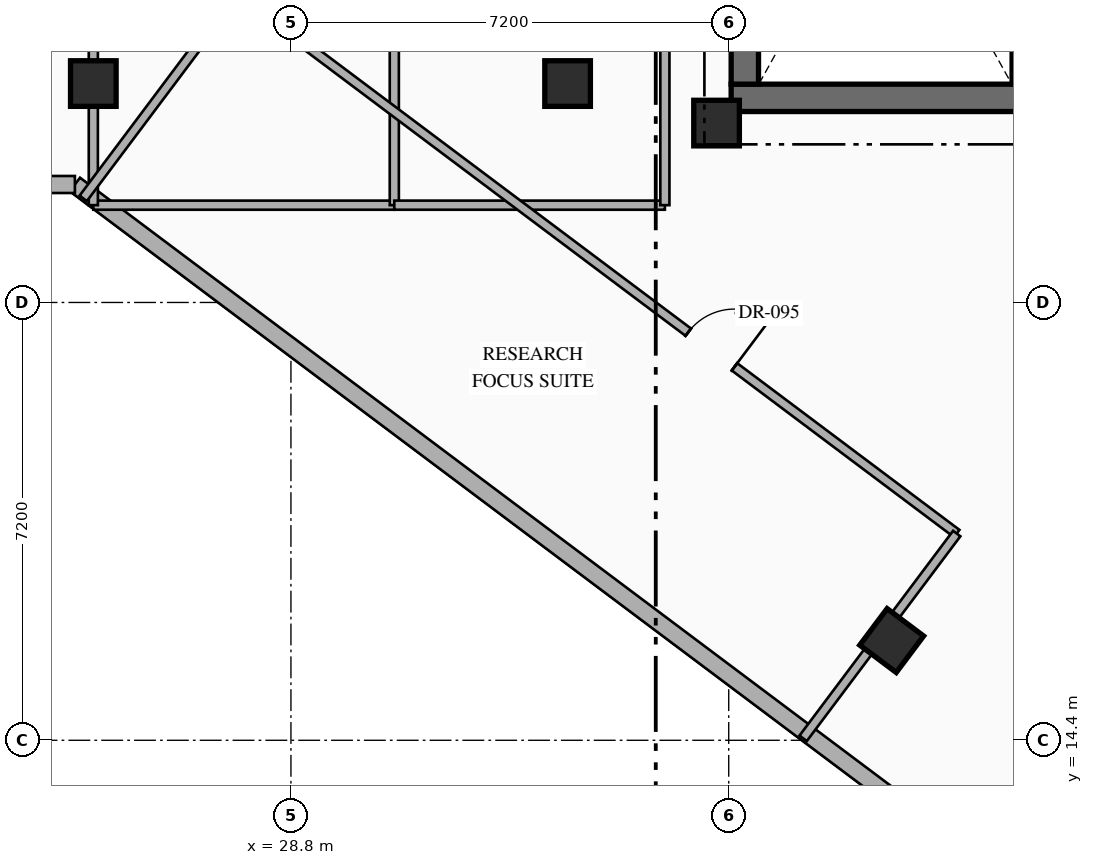
"""IFC4 building model, lengths in metres.
Left out: names, types, materials, properties, quantities, classifications, styles, units other than length and angle.
Written with IfcOpenShell. Run it as: python <this file> out.ifc"""

import sys

from ifc_helpers import new_model, si_unit, direction, frame, frame_2d, origin, origin_2d, place, context, subcontext, project, spatial, rectangle, hollow_rectangle, extrude, element, fill, save


model = new_model("IFC4")
c1 = context("Model", 3, precision=1e-05, world=origin(), true_north=direction((0.0, 1.0)))
c2 = subcontext(c1, "Body", "Model", "MODEL_VIEW")
j1 = project(units=[si_unit("LENGTHUNIT", "METRE"), si_unit("PLANEANGLEUNIT", "RADIAN")], contexts=[c1])
p1 = place(None, origin())
s1 = spatial("IfcSite", under=j1, at=p1, CompositionType="ELEMENT")
p2 = place(p1, origin())
s2 = spatial("IfcBuilding", under=s1, at=p2, CompositionType="ELEMENT")
p3 = place(p2, frame((0.0, 0.0, 209.55)))
s3 = spatial("IfcBuildingStorey", under=s2, at=p3, CompositionType="ELEMENT", Elevation=209.55)
p4 = place(p3, frame((36.04, 24.965, 0.0), z_axis=(0.0, 0.0, 1.0), x_axis=(1.0, 0.0, 0.0)))
e1 = element("IfcWall", 1, at=p4, inside=s3, PredefinedType="SHEAR", context=c2, shape_type="SweptSolid", body=[
    extrude(rectangle(XDim=7.46, YDim=0.45, at=frame_2d((3.73, 0.0))), origin(), (0.0, 0.0, 1.0), 3.6),
])
p5 = place(p3, frame((36.265, 25.19, 0.0), z_axis=(0.0, 0.0, 1.0), x_axis=(0.0, 1.0, 0.0)))
e2 = element("IfcWall", 2, at=p5, inside=s3, PredefinedType="SHEAR", context=c2, shape_type="SweptSolid", body=[
    extrude(rectangle(XDim=9.48, YDim=0.45, at=frame_2d((4.74, 0.0))), origin(), (0.0, 0.0, 1.0), 3.6),
])
p6 = place(p3, frame((40.81, 25.19, 0.0), z_axis=(0.0, 0.0, 1.0), x_axis=(0.0, 1.0, 0.0)))
e3 = element("IfcWall", 3, at=p6, inside=s3, PredefinedType="SHEAR", context=c2, shape_type="SweptSolid", body=[
    extrude(rectangle(XDim=9.48, YDim=0.3, at=frame_2d((4.74, 0.0))), origin(), (0.0, 0.0, 1.0), 3.6),
])
for number, where, z_axis, x_axis in (
    (4, (35.8, 24.55, 0.0), (0.0, 0.0, 1.0), (1.0, 0.0, 0.0)),
    (5, (25.55, 25.2, 0.0), (0.0, 0.0, 1.0), (1.0, 0.0, 0.0)),
    (6, (33.35, 25.2, 0.0), (0.0, 0.0, 1.0), (1.0, 0.0, 0.0)),
    (7, (38.68, 16.04, 0.0), (0.0, 0.0, 1.0), (0.8, -0.6, 0.0)),
):
    element("IfcColumn", number, at=place(p3, frame(where, z_axis=z_axis, x_axis=x_axis)), inside=s3, PredefinedType="COLUMN", context=c2, shape_type="SweptSolid", body=[
        extrude(hollow_rectangle(XDim=0.75, YDim=0.75, WallThickness=0.028, at=origin_2d()), origin(), (0.0, 0.0, 1.0), 3.6),
    ])
p7 = place(p3, frame((44.918, 8.787, 0.0), z_axis=(0.0, 0.0, 1.0), x_axis=(-0.800004765927, 0.599993645378, 0.0)))
e8 = element("IfcWall", 8, at=p7, inside=s3, PredefinedType="STANDARD", context=c2, shape_type="SweptSolid", body=[
    extrude(rectangle(XDim=24.588, YDim=0.28, at=frame_2d((12.294, 0.0))), origin(), (0.0, 0.0, 1.0), 3.35),
])
p8 = place(p3, frame((25.247, 23.54, 0.0), z_axis=(0.0, 0.0, 1.0), x_axis=(-1.0, 0.0, 0.0)))
e9 = element("IfcWall", 9, at=p8, inside=s3, PredefinedType="STANDARD", context=c2, shape_type="SweptSolid", body=[
    extrude(rectangle(XDim=4.789, YDim=0.28, at=frame_2d((2.395, 0.0))), origin(), (0.0, 0.0, 1.0), 3.35),
])
p9 = place(p3, frame((25.55, 23.2, 0.0), z_axis=(0.0, 0.0, 1.0), x_axis=(1.0, 0.0, 0.0)))
e10 = element("IfcWall", 10, at=p9, inside=s3, PredefinedType="PARTITIONING", context=c2, shape_type="SweptSolid", body=[
    extrude(rectangle(XDim=4.95, YDim=0.15, at=frame_2d((2.475, 0.0))), origin(), (0.0, 0.0, 1.0), 3.35),
])
p10 = place(p3, frame((25.55, 23.2, 0.0), z_axis=(0.0, 0.0, 1.0), x_axis=(0.0, 1.0, 0.0)))
e11 = element("IfcWall", 11, at=p10, inside=s3, PredefinedType="PARTITIONING", context=c2, shape_type="SweptSolid", body=[
    extrude(rectangle(XDim=7.15, YDim=0.15, at=frame_2d((3.575, 0.0))), origin(), (0.0, 0.0, 1.0), 2.757),
])
p11 = place(p3, frame((30.5, 23.2, 0.0), z_axis=(0.0, 0.0, 1.0), x_axis=(0.0, 1.0, 0.0)))
e12 = element("IfcWall", 12, at=p11, inside=s3, PredefinedType="PARTITIONING", context=c2, shape_type="SweptSolid", body=[
    extrude(rectangle(XDim=7.15, YDim=0.15, at=frame_2d((3.575, 0.0))), origin(), (0.0, 0.0, 1.0), 3.35),
])
p12 = place(p3, frame((30.5, 23.2, 0.0), z_axis=(0.0, 0.0, 1.0), x_axis=(1.0, 0.0, 0.0)))
e13 = element("IfcWall", 13, at=p12, inside=s3, PredefinedType="PARTITIONING", context=c2, shape_type="SweptSolid", body=[
    extrude(rectangle(XDim=4.45, YDim=0.15, at=frame_2d((2.225, 0.0))), origin(), (0.0, 0.0, 1.0), 3.35),
])
p13 = place(p3, frame((34.95, 23.2, 0.0), z_axis=(0.0, 0.0, 1.0), x_axis=(0.0, 1.0, 0.0)))
e14 = element("IfcWall", 14, at=p13, inside=s3, PredefinedType="PARTITIONING", context=c2, shape_type="SweptSolid", body=[
    extrude(rectangle(XDim=7.15, YDim=0.15, at=frame_2d((3.575, 0.0))), origin(), (0.0, 0.0, 1.0), 3.35),
])
p14 = place(p3, frame((27.91, 26.68, 0.0), z_axis=(0.0, 0.0, 1.0), x_axis=(0.800005938517, -0.599992081896, 0.0)))
e15 = element("IfcWall", 15, at=p14, inside=s3, PredefinedType="PARTITIONING", context=c2, shape_type="SweptSolid", body=[
    extrude(rectangle(XDim=14.8, YDim=0.15, at=frame_2d((7.4, 0.0))), origin(), (0.0, 0.0, 1.0), 3.35),
])
p15 = place(p14, frame((9.281, 0.0, 0.0)))
e16 = element("IfcOpeningElement", 16, at=p15, cuts=e15, PredefinedType="OPENING", context=c2, shape_type="SweptSolid", body=[
    extrude(rectangle(XDim=0.95, YDim=2.15, at=frame_2d((0.475, 1.075))), frame((0.0, 0.085, 0.0), z_axis=(0.0, -1.0, 0.0), x_axis=(1.0, 0.0, 0.0)), (0.0, 0.0, 1.0), 0.17),
])
p16 = place(p3, frame((25.384, 23.312, 0.0), z_axis=(0.0, 0.0, 1.0), x_axis=(0.599990721155, 0.80000695905, 0.0)))
e17 = element("IfcWall", 17, at=p16, inside=s3, PredefinedType="PARTITIONING", context=c2, shape_type="SweptSolid", body=[
    extrude(rectangle(XDim=4.21, YDim=0.15, at=frame_2d((2.105, 0.0))), origin(), (0.0, 0.0, 1.0), 3.35),
])
p17 = place(p3, frame((37.224, 14.432, 0.0), z_axis=(0.0, 0.0, 1.0), x_axis=(0.599962885857, 0.800027834262, 0.0)))
e18 = element("IfcWall", 18, at=p17, inside=s3, PredefinedType="PARTITIONING", context=c2, shape_type="SweptSolid", body=[
    extrude(rectangle(XDim=4.21, YDim=0.15, at=frame_2d((2.105, 0.0))), origin(), (0.0, 0.0, 1.0), 2.757),
])
p18 = place(p15, origin())
e19 = element("IfcDoor", 19, at=p18, inside=s3, OperationType="SINGLE_SWING_RIGHT", PredefinedType="DOOR", context=c2, shape_type="SweptSolid", body=[
    extrude(rectangle(XDim=0.95, YDim=2.15, at=frame_2d((0.475, 1.075))), frame((0.0, 0.025, 0.0), z_axis=(0.0, -1.0, 0.0), x_axis=(1.0, 0.0, 0.0)), (0.0, 0.0, 1.0), 0.05),
])
fill(e16, e19)
save(model, sys.argv[1])
